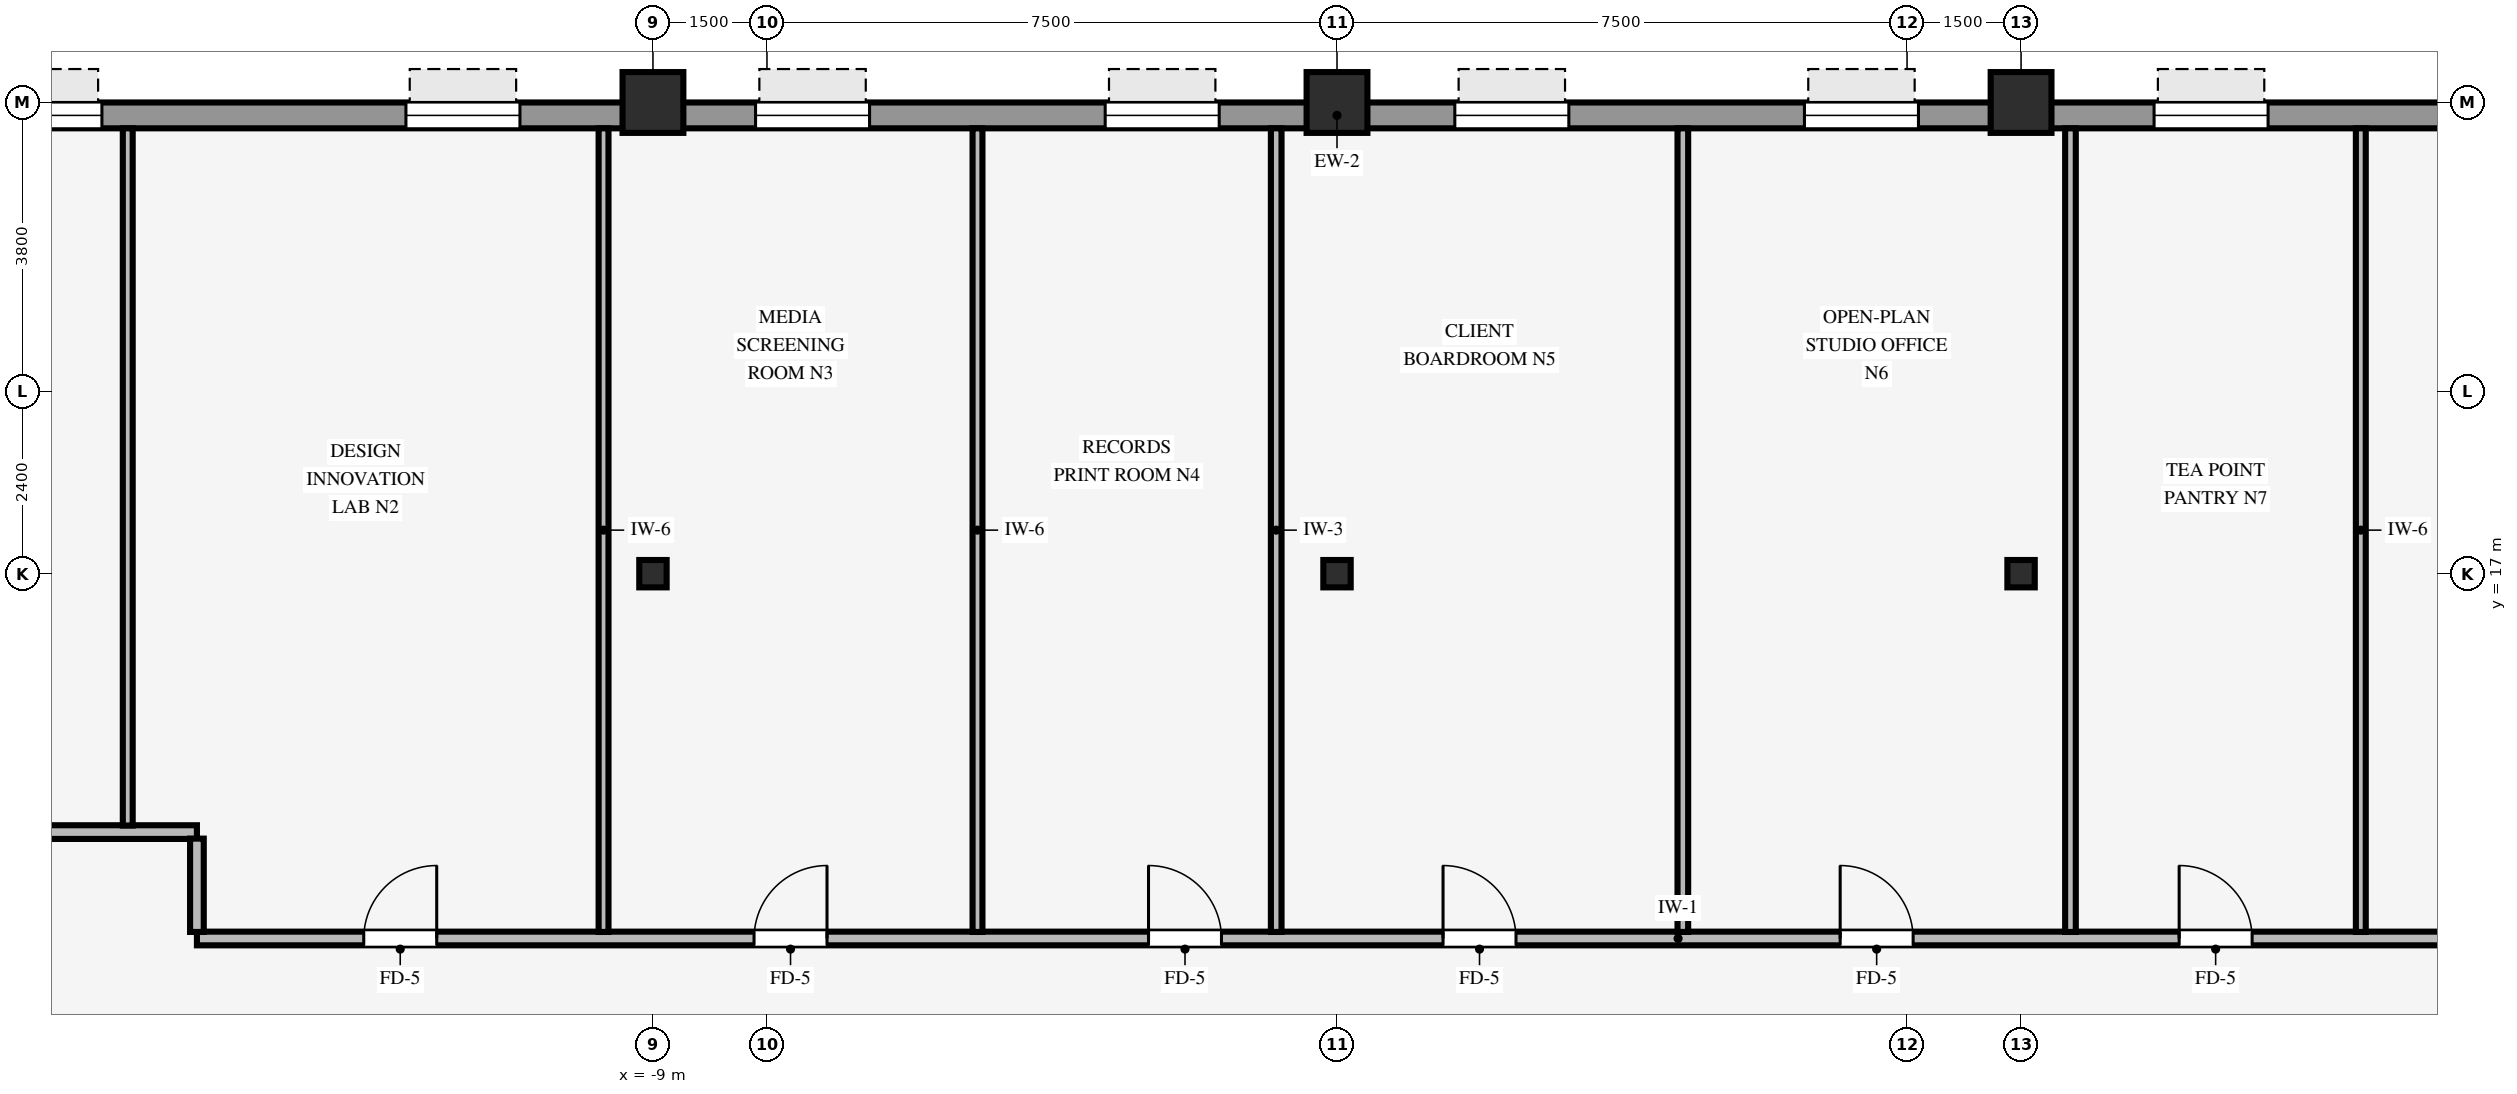
"""IFC4 building model, lengths in metres.
Left out: names, types, materials, properties, quantities, classifications, styles, units other than length and angle.
Written with IfcOpenShell. Run it as: python <this file> out.ifc"""

import sys

from ifc_helpers import new_model, si_unit, direction, frame, frame_2d, origin, origin_2d, place, context, subcontext, project, spatial, rectangle, hollow_rectangle, i_section, extrude, source, transform, mapped, element, fill, save


model = new_model("IFC4")
c1 = context("Model", 3, precision=1e-05, world=origin(), true_north=direction((0.0, 1.0)))
c2 = subcontext(c1, "Body", "Model", "MODEL_VIEW")
j1 = project(units=[si_unit("LENGTHUNIT", "METRE"), si_unit("PLANEANGLEUNIT", "RADIAN")], contexts=[c1])
p1 = place(None, origin())
s1 = spatial("IfcSite", under=j1, at=p1, CompositionType="ELEMENT")
p2 = place(p1, origin())
s2 = spatial("IfcBuilding", under=s1, at=p2, CompositionType="ELEMENT")
p3 = place(p2, frame((0.0, 0.0, 67.75)))
s3 = spatial("IfcBuildingStorey", under=s2, at=p3, CompositionType="ELEMENT", Elevation=67.75)
for number, where, z_axis, x_axis in (
    (1, (-9.0, 23.2, 0.0), (0.0, 0.0, 1.0), (1.0, 0.0, 0.0)),
    (2, (0.0, 23.2, 0.0), (0.0, 0.0, 1.0), (1.0, 0.0, 0.0)),
    (3, (9.0, 23.2, 0.0), (0.0, 0.0, 1.0), (1.0, 0.0, 0.0)),
):
    element("IfcColumn", number, at=place(p3, frame(where, z_axis=z_axis, x_axis=x_axis)), inside=s3, PredefinedType="COLUMN", context=c2, shape_type="SweptSolid", body=[
        extrude(hollow_rectangle(XDim=0.8, YDim=0.8, WallThickness=0.055, InnerFilletRadius=0.055, OuterFilletRadius=0.11, at=origin_2d()), origin(), (0.0, 0.0, 1.0), 3.37),
    ])
for number, where, z_axis, x_axis in (
    (4, (0.0, 17.0, 0.0), (0.0, 0.0, 1.0), (1.0, 0.0, 0.0)),
    (5, (-9.0, 17.0, 0.0), (0.0, 0.0, 1.0), (1.0, 0.0, 0.0)),
    (6, (9.0, 17.0, 0.0), (0.0, 0.0, 1.0), (1.0, 0.0, 0.0)),
):
    element("IfcColumn", number, at=place(p3, frame(where, z_axis=z_axis, x_axis=x_axis)), inside=s3, PredefinedType="COLUMN", context=c2, shape_type="SweptSolid", body=[
        extrude(i_section(OverallWidth=0.36, OverallDepth=0.36, WebThickness=0.021, FlangeThickness=0.021, FilletRadius=0.018, at=origin_2d()), origin(), (0.0, 0.0, 1.0), 3.37),
    ])
p4 = place(p3, frame((-19.4, 23.03, 0.0), z_axis=(0.0, 0.0, 1.0), x_axis=(1.0, 0.0, 0.0)))
e7 = element("IfcWall", 7, at=p4, inside=s3, PredefinedType="STANDARD", context=c2, shape_type="SweptSolid", body=[
    extrude(rectangle(XDim=38.8, YDim=0.34, at=frame_2d((19.4, 0.0))), origin(), (0.0, 0.0, 1.0), 2.705),
])
p5 = place(p4, frame((1.65, 0.0, 0.8)))
e8 = element("IfcOpeningElement", 8, at=p5, cuts=e7, PredefinedType="OPENING", context=c2, shape_type="SweptSolid", body=[
    extrude(rectangle(XDim=1.5, YDim=1.6, at=frame_2d((0.75, 0.8))), frame((0.0, 0.18, 0.0), z_axis=(0.0, -1.0, 0.0), x_axis=(1.0, 0.0, 0.0)), (0.0, 0.0, 1.0), 0.36),
])
p6 = place(p4, frame((7.15, 0.0, 0.8)))
e9 = element("IfcOpeningElement", 9, at=p6, cuts=e7, PredefinedType="OPENING", context=c2, shape_type="SweptSolid", body=[
    extrude(rectangle(XDim=1.5, YDim=1.6, at=frame_2d((0.75, 0.8))), frame((0.0, 0.18, 0.0), z_axis=(0.0, -1.0, 0.0), x_axis=(1.0, 0.0, 0.0)), (0.0, 0.0, 1.0), 0.36),
])
p7 = place(p4, frame((11.75, 0.0, 0.8)))
e10 = element("IfcOpeningElement", 10, at=p7, cuts=e7, PredefinedType="OPENING", context=c2, shape_type="SweptSolid", body=[
    extrude(rectangle(XDim=1.5, YDim=1.6, at=frame_2d((0.75, 0.8))), frame((0.0, 0.18, 0.0), z_axis=(0.0, -1.0, 0.0), x_axis=(1.0, 0.0, 0.0)), (0.0, 0.0, 1.0), 0.36),
])
p8 = place(p4, frame((16.35, 0.0, 0.8)))
e11 = element("IfcOpeningElement", 11, at=p8, cuts=e7, PredefinedType="OPENING", context=c2, shape_type="SweptSolid", body=[
    extrude(rectangle(XDim=1.5, YDim=1.6, at=frame_2d((0.75, 0.8))), frame((0.0, 0.18, 0.0), z_axis=(0.0, -1.0, 0.0), x_axis=(1.0, 0.0, 0.0)), (0.0, 0.0, 1.0), 0.36),
])
p9 = place(p4, frame((20.95, 0.0, 0.8)))
e12 = element("IfcOpeningElement", 12, at=p9, cuts=e7, PredefinedType="OPENING", context=c2, shape_type="SweptSolid", body=[
    extrude(rectangle(XDim=1.5, YDim=1.6, at=frame_2d((0.75, 0.8))), frame((0.0, 0.18, 0.0), z_axis=(0.0, -1.0, 0.0), x_axis=(1.0, 0.0, 0.0)), (0.0, 0.0, 1.0), 0.36),
])
p10 = place(p4, frame((25.55, 0.0, 0.8)))
e13 = element("IfcOpeningElement", 13, at=p10, cuts=e7, PredefinedType="OPENING", context=c2, shape_type="SweptSolid", body=[
    extrude(rectangle(XDim=1.5, YDim=1.6, at=frame_2d((0.75, 0.8))), frame((0.0, 0.18, 0.0), z_axis=(0.0, -1.0, 0.0), x_axis=(1.0, 0.0, 0.0)), (0.0, 0.0, 1.0), 0.36),
])
p11 = place(p4, frame((30.15, 0.0, 0.8)))
e14 = element("IfcOpeningElement", 14, at=p11, cuts=e7, PredefinedType="OPENING", context=c2, shape_type="SweptSolid", body=[
    extrude(rectangle(XDim=1.5, YDim=1.6, at=frame_2d((0.75, 0.8))), frame((0.0, 0.18, 0.0), z_axis=(0.0, -1.0, 0.0), x_axis=(1.0, 0.0, 0.0)), (0.0, 0.0, 1.0), 0.36),
])
p12 = place(p4, frame((34.75, 0.0, 0.8)))
e15 = element("IfcOpeningElement", 15, at=p12, cuts=e7, PredefinedType="OPENING", context=c2, shape_type="SweptSolid", body=[
    extrude(rectangle(XDim=1.5, YDim=1.6, at=frame_2d((0.75, 0.8))), frame((0.0, 0.18, 0.0), z_axis=(0.0, -1.0, 0.0), x_axis=(1.0, 0.0, 0.0)), (0.0, 0.0, 1.0), 0.36),
])
p13 = place(p3, frame((-15.0, 12.2, 0.0), z_axis=(0.0, 0.0, 1.0), x_axis=(1.0, 0.0, 0.0)))
e16 = element("IfcWall", 16, at=p13, inside=s3, PredefinedType="PARTITIONING", context=c2, shape_type="SweptSolid", body=[
    extrude(rectangle(XDim=30.0, YDim=0.18, at=frame_2d((15.0, 0.0))), origin(), (0.0, 0.0, 1.0), 3.36),
])
p14 = place(p13, frame((2.195, 0.0, 0.0)))
e17 = element("IfcOpeningElement", 17, at=p14, cuts=e16, PredefinedType="OPENING", context=c2, shape_type="SweptSolid", body=[
    extrude(rectangle(XDim=0.96, YDim=2.1, at=frame_2d((0.48, 1.05))), frame((0.0, 0.1, 0.0), z_axis=(0.0, -1.0, 0.0), x_axis=(1.0, 0.0, 0.0)), (0.0, 0.0, 1.0), 0.2),
])
p15 = place(p13, frame((16.395, 0.0, 0.0)))
e18 = element("IfcOpeningElement", 18, at=p15, cuts=e16, PredefinedType="OPENING", context=c2, shape_type="SweptSolid", body=[
    extrude(rectangle(XDim=0.96, YDim=2.1, at=frame_2d((0.48, 1.05))), frame((0.0, 0.1, 0.0), z_axis=(0.0, -1.0, 0.0), x_axis=(1.0, 0.0, 0.0)), (0.0, 0.0, 1.0), 0.2),
])
p16 = place(p13, frame((21.62, 0.0, 0.0)))
e19 = element("IfcOpeningElement", 19, at=p16, cuts=e16, PredefinedType="OPENING", context=c2, shape_type="SweptSolid", body=[
    extrude(rectangle(XDim=0.96, YDim=2.1, at=frame_2d((0.48, 1.05))), frame((0.0, 0.1, 0.0), z_axis=(0.0, -1.0, 0.0), x_axis=(1.0, 0.0, 0.0)), (0.0, 0.0, 1.0), 0.2),
])
p17 = place(p13, frame((7.33, 0.0, 0.0)))
e20 = element("IfcOpeningElement", 20, at=p17, cuts=e16, PredefinedType="OPENING", context=c2, shape_type="SweptSolid", body=[
    extrude(rectangle(XDim=0.96, YDim=2.1, at=frame_2d((0.48, 1.05))), frame((0.0, 0.1, 0.0), z_axis=(0.0, -1.0, 0.0), x_axis=(1.0, 0.0, 0.0)), (0.0, 0.0, 1.0), 0.2),
])
p18 = place(p13, frame((26.08, 0.0, 0.0)))
e21 = element("IfcOpeningElement", 21, at=p18, cuts=e16, PredefinedType="OPENING", context=c2, shape_type="SweptSolid", body=[
    extrude(rectangle(XDim=0.96, YDim=2.1, at=frame_2d((0.48, 1.05))), frame((0.0, 0.1, 0.0), z_axis=(0.0, -1.0, 0.0), x_axis=(1.0, 0.0, 0.0)), (0.0, 0.0, 1.0), 0.2),
])
p19 = place(p13, frame((12.52, 0.0, 0.0)))
e22 = element("IfcOpeningElement", 22, at=p19, cuts=e16, PredefinedType="OPENING", context=c2, shape_type="SweptSolid", body=[
    extrude(rectangle(XDim=0.96, YDim=2.1, at=frame_2d((0.48, 1.05))), frame((0.0, 0.1, 0.0), z_axis=(0.0, -1.0, 0.0), x_axis=(1.0, 0.0, 0.0)), (0.0, 0.0, 1.0), 0.2),
])
p20 = place(p3, frame((-20.5, 13.6, 0.0), z_axis=(0.0, 0.0, 1.0), x_axis=(1.0, 0.0, 0.0)))
e23 = element("IfcWall", 23, at=p20, inside=s3, PredefinedType="PARTITIONING", context=c2, shape_type="SweptSolid", body=[
    extrude(rectangle(XDim=5.5, YDim=0.18, at=frame_2d((2.75, 0.0))), origin(), (0.0, 0.0, 1.0), 2.942),
])
p21 = place(p20, frame((1.815, 0.0, 0.0)))
e24 = element("IfcOpeningElement", 24, at=p21, cuts=e23, PredefinedType="OPENING", context=c2, shape_type="SweptSolid", body=[
    extrude(rectangle(XDim=0.96, YDim=2.1, at=frame_2d((0.48, 1.05))), frame((0.0, 0.1, 0.0), z_axis=(0.0, -1.0, 0.0), x_axis=(1.0, 0.0, 0.0)), (0.0, 0.0, 1.0), 0.2),
])
p22 = place(p3, frame((-15.91, 13.686, 0.0), z_axis=(0.0, 0.0, 1.0), x_axis=(0.0, 1.0, 0.0)))
e25 = element("IfcWall", 25, at=p22, inside=s3, PredefinedType="PARTITIONING", context=c2, shape_type="SweptSolid", body=[
    extrude(rectangle(XDim=9.174, YDim=0.13, at=frame_2d((4.587, 0.0))), origin(), (0.0, 0.0, 1.0), 3.36),
])
p23 = place(p3, frame((-15.0, 12.286, 0.0), z_axis=(0.0, 0.0, 1.0), x_axis=(0.0, 1.0, 0.0)))
e26 = element("IfcWall", 26, at=p23, inside=s3, PredefinedType="PARTITIONING", context=c2, shape_type="SweptSolid", body=[
    extrude(rectangle(XDim=1.228, YDim=0.18, at=frame_2d((0.614, 0.0))), origin(), (0.0, 0.0, 1.0), 3.36),
])
for number, where, z_axis, x_axis in (
    (27, (-9.65, 12.286, 0.0), (0.0, 0.0, 1.0), (0.0, 1.0, 0.0)),
    (28, (-4.73, 12.286, 0.0), (0.0, 0.0, 1.0), (0.0, 1.0, 0.0)),
):
    element("IfcWall", number, at=place(p3, frame(where, z_axis=z_axis, x_axis=x_axis)), inside=s3, PredefinedType="PARTITIONING", context=c2, shape_type="SweptSolid", body=[
        extrude(rectangle(XDim=10.574, YDim=0.13, at=frame_2d((5.287, 0.0))), origin(), (0.0, 0.0, 1.0), 3.36),
    ])
for number, where, z_axis, x_axis in (
    (29, (-0.8, 12.286, 0.0), (0.0, 0.0, 1.0), (0.0, 1.0, 0.0)),
    (30, (4.55, 12.286, 0.0), (0.0, 0.0, 1.0), (0.0, 1.0, 0.0)),
    (31, (9.65, 12.286, 0.0), (0.0, 0.0, 1.0), (0.0, 1.0, 0.0)),
):
    element("IfcWall", number, at=place(p3, frame(where, z_axis=z_axis, x_axis=x_axis)), inside=s3, PredefinedType="PARTITIONING", context=c2, shape_type="SweptSolid", body=[
        extrude(rectangle(XDim=10.574, YDim=0.14, at=frame_2d((5.287, 0.0))), origin(), (0.0, 0.0, 1.0), 3.36),
    ])
p24 = place(p3, frame((13.47, 12.286, 0.0), z_axis=(0.0, 0.0, 1.0), x_axis=(0.0, 1.0, 0.0)))
e32 = element("IfcWall", 32, at=p24, inside=s3, PredefinedType="PARTITIONING", context=c2, shape_type="SweptSolid", body=[
    extrude(rectangle(XDim=10.574, YDim=0.13, at=frame_2d((5.287, 0.0))), origin(), (0.0, 0.0, 1.0), 3.36),
])
m1 = source(origin(), c2, "Body", "SweptSolid", [
    extrude(rectangle(XDim=1.5, YDim=1.6, at=frame_2d((0.75, 0.8))), frame((0.0, 0.03, 0.0), z_axis=(0.0, -1.0, 0.0), x_axis=(1.0, 0.0, 0.0)), (0.0, 0.0, 1.0), 0.06),
])
p25 = place(p5, origin())
e33 = element("IfcWindow", 33, at=p25, inside=s3, PartitioningType="SINGLE_PANEL", PredefinedType="WINDOW", context=c2, shape_type="MappedRepresentation", body=[
    mapped(m1, transform((0.0, 0.0, 0.0), scale=1.0)),
])
fill(e8, e33)
p26 = place(p6, origin())
e34 = element("IfcWindow", 34, at=p26, inside=s3, PartitioningType="SINGLE_PANEL", PredefinedType="WINDOW", context=c2, shape_type="MappedRepresentation", body=[
    mapped(m1, transform((0.0, 0.0, 0.0), scale=1.0)),
])
fill(e9, e34)
p27 = place(p7, origin())
e35 = element("IfcWindow", 35, at=p27, inside=s3, PartitioningType="SINGLE_PANEL", PredefinedType="WINDOW", context=c2, shape_type="MappedRepresentation", body=[
    mapped(m1, transform((0.0, 0.0, 0.0), scale=1.0)),
])
fill(e10, e35)
p28 = place(p8, origin())
e36 = element("IfcWindow", 36, at=p28, inside=s3, PartitioningType="SINGLE_PANEL", PredefinedType="WINDOW", context=c2, shape_type="MappedRepresentation", body=[
    mapped(m1, transform((0.0, 0.0, 0.0), scale=1.0)),
])
fill(e11, e36)
p29 = place(p9, origin())
e37 = element("IfcWindow", 37, at=p29, inside=s3, PartitioningType="SINGLE_PANEL", PredefinedType="WINDOW", context=c2, shape_type="MappedRepresentation", body=[
    mapped(m1, transform((0.0, 0.0, 0.0), scale=1.0)),
])
fill(e12, e37)
p30 = place(p10, origin())
e38 = element("IfcWindow", 38, at=p30, inside=s3, PartitioningType="SINGLE_PANEL", PredefinedType="WINDOW", context=c2, shape_type="MappedRepresentation", body=[
    mapped(m1, transform((0.0, 0.0, 0.0), scale=1.0)),
])
fill(e13, e38)
p31 = place(p11, origin())
e39 = element("IfcWindow", 39, at=p31, inside=s3, PartitioningType="SINGLE_PANEL", PredefinedType="WINDOW", context=c2, shape_type="MappedRepresentation", body=[
    mapped(m1, transform((0.0, 0.0, 0.0), scale=1.0)),
])
fill(e14, e39)
m2 = source(origin(), c2, "Body", "SweptSolid", [
    extrude(rectangle(XDim=0.96, YDim=2.1, at=frame_2d((0.48, 1.05))), frame((0.0, 0.025, 0.0), z_axis=(0.0, -1.0, 0.0), x_axis=(1.0, 0.0, 0.0)), (0.0, 0.0, 1.0), 0.05),
])
p32 = place(p14, origin())
e40 = element("IfcDoor", 40, at=p32, inside=s3, OperationType="SINGLE_SWING_RIGHT", PredefinedType="DOOR", context=c2, shape_type="MappedRepresentation", body=[
    mapped(m2, transform((0.0, 0.0, 0.0), scale=1.0)),
])
fill(e17, e40)
p33 = place(p15, origin())
e41 = element("IfcDoor", 41, at=p33, inside=s3, OperationType="SINGLE_SWING_LEFT", PredefinedType="DOOR", context=c2, shape_type="MappedRepresentation", body=[
    mapped(m2, transform((0.0, 0.0, 0.0), scale=1.0)),
])
fill(e18, e41)
p34 = place(p16, origin())
e42 = element("IfcDoor", 42, at=p34, inside=s3, OperationType="SINGLE_SWING_LEFT", PredefinedType="DOOR", context=c2, shape_type="MappedRepresentation", body=[
    mapped(m2, transform((0.0, 0.0, 0.0), scale=1.0)),
])
fill(e19, e42)
p35 = place(p17, origin())
e43 = element("IfcDoor", 43, at=p35, inside=s3, OperationType="SINGLE_SWING_RIGHT", PredefinedType="DOOR", context=c2, shape_type="MappedRepresentation", body=[
    mapped(m2, transform((0.0, 0.0, 0.0), scale=1.0)),
])
fill(e20, e43)
p36 = place(p18, origin())
e44 = element("IfcDoor", 44, at=p36, inside=s3, OperationType="SINGLE_SWING_LEFT", PredefinedType="DOOR", context=c2, shape_type="MappedRepresentation", body=[
    mapped(m2, transform((0.0, 0.0, 0.0), scale=1.0)),
])
fill(e21, e44)
p37 = place(p19, origin())
e45 = element("IfcDoor", 45, at=p37, inside=s3, OperationType="SINGLE_SWING_LEFT", PredefinedType="DOOR", context=c2, shape_type="MappedRepresentation", body=[
    mapped(m2, transform((0.0, 0.0, 0.0), scale=1.0)),
])
fill(e22, e45)
save(model, sys.argv[1])
